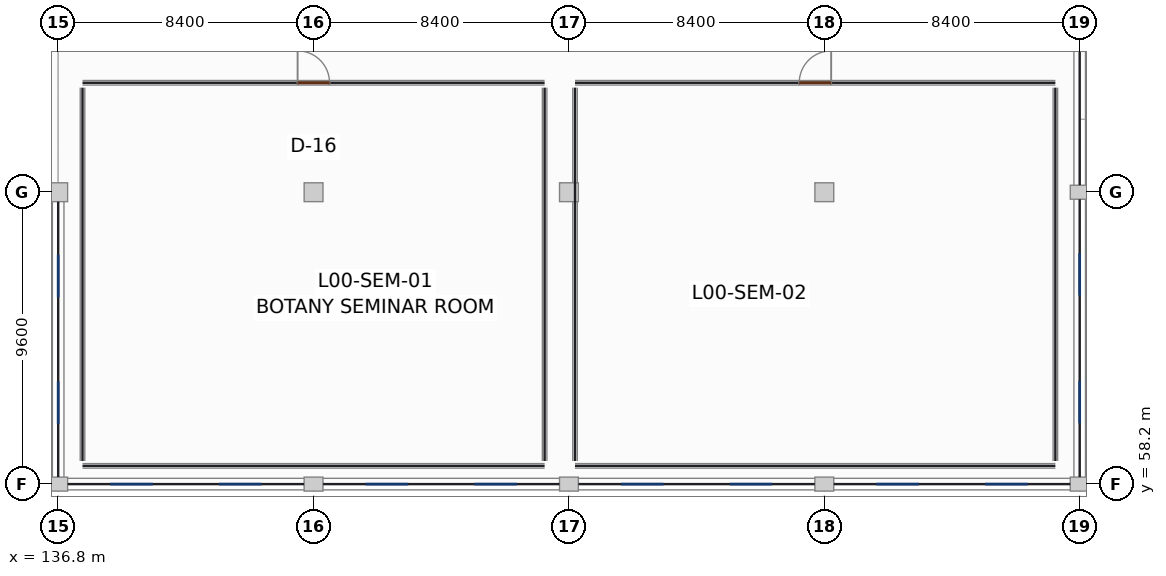
"""IFC4 building model, lengths in metres.
Left out: names, types, materials, properties, quantities, classifications, styles, units other than length and angle.
Written with IfcOpenShell. Run it as: python <this file> out.ifc"""

import sys

from ifc_helpers import new_model, si_unit, direction, frame, frame_2d, origin, origin_2d, place, context, subcontext, project, spatial, rectangle, extrude, element, fill, save


model = new_model("IFC4")
c1 = context("Model", 3, precision=1e-05, world=origin(), true_north=direction((0.0, 1.0)))
c2 = subcontext(c1, "Body", "Model", "MODEL_VIEW")
j1 = project(units=[si_unit("LENGTHUNIT", "METRE"), si_unit("PLANEANGLEUNIT", "RADIAN")], contexts=[c1])
p1 = place(None, origin())
s1 = spatial("IfcSite", under=j1, at=p1, CompositionType="ELEMENT")
p2 = place(p1, origin())
s2 = spatial("IfcBuilding", under=s1, at=p2, CompositionType="ELEMENT")
p3 = place(p2, origin())
s3 = spatial("IfcBuildingStorey", under=s2, at=p3, CompositionType="ELEMENT", Elevation=0.0)
p4 = place(p3, frame((136.8, 58.2, 0.0), z_axis=(0.0, 0.0, 1.0), x_axis=(1.0, 0.0, 0.0)))
e1 = element("IfcColumn", 1, at=p4, inside=s3, PredefinedType="COLUMN", context=c2, shape_type="SweptSolid", body=[
    extrude(rectangle(XDim=0.62, YDim=0.46, at=origin_2d()), origin(), (0.0, 0.0, 1.0), 5.08),
])
p5 = place(p3, frame((136.8, 67.8, 0.0), z_axis=(0.0, 0.0, 1.0), x_axis=(1.0, 0.0, 0.0)))
e2 = element("IfcColumn", 2, at=p5, inside=s3, PredefinedType="COLUMN", context=c2, shape_type="SweptSolid", body=[
    extrude(rectangle(XDim=0.62, YDim=0.62, at=origin_2d()), origin(), (0.0, 0.0, 1.0), 5.08),
])
p6 = place(p3, frame((145.2, 58.2, 0.0), z_axis=(0.0, 0.0, 1.0), x_axis=(1.0, 0.0, 0.0)))
e3 = element("IfcColumn", 3, at=p6, inside=s3, PredefinedType="COLUMN", context=c2, shape_type="SweptSolid", body=[
    extrude(rectangle(XDim=0.62, YDim=0.46, at=origin_2d()), origin(), (0.0, 0.0, 1.0), 5.08),
])
p7 = place(p3, frame((145.2, 67.8, 0.0), z_axis=(0.0, 0.0, 1.0), x_axis=(1.0, 0.0, 0.0)))
e4 = element("IfcColumn", 4, at=p7, inside=s3, PredefinedType="COLUMN", context=c2, shape_type="SweptSolid", body=[
    extrude(rectangle(XDim=0.62, YDim=0.62, at=origin_2d()), origin(), (0.0, 0.0, 1.0), 5.08),
])
p8 = place(p3, frame((153.6, 58.2, 0.0), z_axis=(0.0, 0.0, 1.0), x_axis=(1.0, 0.0, 0.0)))
e5 = element("IfcColumn", 5, at=p8, inside=s3, PredefinedType="COLUMN", context=c2, shape_type="SweptSolid", body=[
    extrude(rectangle(XDim=0.62, YDim=0.46, at=origin_2d()), origin(), (0.0, 0.0, 1.0), 5.08),
])
p9 = place(p3, frame((153.6, 67.8, 0.0), z_axis=(0.0, 0.0, 1.0), x_axis=(1.0, 0.0, 0.0)))
e6 = element("IfcColumn", 6, at=p9, inside=s3, PredefinedType="COLUMN", context=c2, shape_type="SweptSolid", body=[
    extrude(rectangle(XDim=0.62, YDim=0.62, at=origin_2d()), origin(), (0.0, 0.0, 1.0), 5.08),
])
p10 = place(p3, frame((162.0, 58.2, 0.0), z_axis=(0.0, 0.0, 1.0), x_axis=(1.0, 0.0, 0.0)))
e7 = element("IfcColumn", 7, at=p10, inside=s3, PredefinedType="COLUMN", context=c2, shape_type="SweptSolid", body=[
    extrude(rectangle(XDim=0.62, YDim=0.46, at=origin_2d()), origin(), (0.0, 0.0, 1.0), 5.08),
])
p11 = place(p3, frame((162.0, 67.8, 0.0), z_axis=(0.0, 0.0, 1.0), x_axis=(1.0, 0.0, 0.0)))
e8 = element("IfcColumn", 8, at=p11, inside=s3, PredefinedType="COLUMN", context=c2, shape_type="SweptSolid", body=[
    extrude(rectangle(XDim=0.62, YDim=0.62, at=origin_2d()), origin(), (0.0, 0.0, 1.0), 5.08),
])
for number, where, z_axis, x_axis in (
    (9, (170.4, 58.2, 0.0), (0.0, 0.0, 1.0), (1.0, 0.0, 0.0)),
    (10, (170.4, 67.8, 0.0), (0.0, 0.0, 1.0), (1.0, 0.0, 0.0)),
):
    element("IfcColumn", number, at=place(p3, frame(where, z_axis=z_axis, x_axis=x_axis)), inside=s3, PredefinedType="COLUMN", context=c2, shape_type="SweptSolid", body=[
        extrude(rectangle(XDim=0.62, YDim=0.46, at=origin_2d()), origin(), (0.0, 0.0, 1.0), 5.08),
    ])
p12 = place(p3, frame((170.4, 58.432, 0.0), z_axis=(0.0, 0.0, 1.0), x_axis=(0.0, 1.0, 0.0)))
e11 = element("IfcWall", 11, at=p12, inside=s3, PredefinedType="SOLIDWALL", context=c2, shape_type="SweptSolid", body=[
    extrude(rectangle(XDim=9.136, YDim=0.38, at=frame_2d((4.568, 0.0))), origin(), (0.0, 0.0, 1.0), 4.28),
])
p13 = place(p12, frame((1.767, 0.0, 0.85)))
e12 = element("IfcOpeningElement", 12, at=p13, cuts=e11, PredefinedType="OPENING", context=c2, shape_type="SweptSolid", body=[
    extrude(rectangle(XDim=1.4, YDim=1.65, at=frame_2d((0.7, 0.825))), frame((0.0, 0.2, 0.0), z_axis=(0.0, -1.0, 0.0), x_axis=(1.0, 0.0, 0.0)), (0.0, 0.0, 1.0), 0.4),
])
p14 = place(p12, frame((5.969, 0.0, 0.85)))
e13 = element("IfcOpeningElement", 13, at=p14, cuts=e11, PredefinedType="OPENING", context=c2, shape_type="SweptSolid", body=[
    extrude(rectangle(XDim=1.4, YDim=1.65, at=frame_2d((0.7, 0.825))), frame((0.0, 0.2, 0.0), z_axis=(0.0, -1.0, 0.0), x_axis=(1.0, 0.0, 0.0)), (0.0, 0.0, 1.0), 0.4),
])
p15 = place(p3, frame((170.4, 68.032, 0.0), z_axis=(0.0, 0.0, 1.0), x_axis=(0.0, 1.0, 0.0)))
e14 = element("IfcWall", 14, at=p15, inside=s3, PredefinedType="SOLIDWALL", context=c2, shape_type="SweptSolid", body=[
    extrude(rectangle(XDim=9.136, YDim=0.38, at=frame_2d((4.568, 0.0))), origin(), (0.0, 0.0, 1.0), 4.28),
])
p16 = place(p15, frame((4.618, 0.0, 0.0)))
e15 = element("IfcOpeningElement", 15, at=p16, cuts=e14, PredefinedType="OPENING", context=c2, shape_type="SweptSolid", body=[
    extrude(rectangle(XDim=1.5, YDim=2.2, at=frame_2d((0.75, 1.1))), frame((0.0, 0.2, 0.0), z_axis=(0.0, -1.0, 0.0), x_axis=(1.0, 0.0, 0.0)), (0.0, 0.0, 1.0), 0.4),
])
p17 = place(p3, frame((137.112, 58.2, 0.0), z_axis=(0.0, 0.0, 1.0), x_axis=(1.0, 0.0, 0.0)))
e16 = element("IfcWall", 16, at=p17, inside=s3, PredefinedType="SOLIDWALL", context=c2, shape_type="SweptSolid", body=[
    extrude(rectangle(XDim=7.776, YDim=0.38, at=frame_2d((3.888, 0.0))), origin(), (0.0, 0.0, 1.0), 4.28),
])
p18 = place(p17, frame((1.399, 0.0, 0.85)))
e17 = element("IfcOpeningElement", 17, at=p18, cuts=e16, PredefinedType="OPENING", context=c2, shape_type="SweptSolid", body=[
    extrude(rectangle(XDim=1.4, YDim=1.65, at=frame_2d((0.7, 0.825))), frame((0.0, 0.2, 0.0), z_axis=(0.0, -1.0, 0.0), x_axis=(1.0, 0.0, 0.0)), (0.0, 0.0, 1.0), 0.4),
])
p19 = place(p17, frame((4.977, 0.0, 0.85)))
e18 = element("IfcOpeningElement", 18, at=p19, cuts=e16, PredefinedType="OPENING", context=c2, shape_type="SweptSolid", body=[
    extrude(rectangle(XDim=1.4, YDim=1.65, at=frame_2d((0.7, 0.825))), frame((0.0, 0.2, 0.0), z_axis=(0.0, -1.0, 0.0), x_axis=(1.0, 0.0, 0.0)), (0.0, 0.0, 1.0), 0.4),
])
p20 = place(p3, frame((145.512, 58.2, 0.0), z_axis=(0.0, 0.0, 1.0), x_axis=(1.0, 0.0, 0.0)))
e19 = element("IfcWall", 19, at=p20, inside=s3, PredefinedType="SOLIDWALL", context=c2, shape_type="SweptSolid", body=[
    extrude(rectangle(XDim=7.776, YDim=0.38, at=frame_2d((3.888, 0.0))), origin(), (0.0, 0.0, 1.0), 4.28),
])
p21 = place(p20, frame((1.399, 0.0, 0.85)))
e20 = element("IfcOpeningElement", 20, at=p21, cuts=e19, PredefinedType="OPENING", context=c2, shape_type="SweptSolid", body=[
    extrude(rectangle(XDim=1.4, YDim=1.65, at=frame_2d((0.7, 0.825))), frame((0.0, 0.2, 0.0), z_axis=(0.0, -1.0, 0.0), x_axis=(1.0, 0.0, 0.0)), (0.0, 0.0, 1.0), 0.4),
])
p22 = place(p20, frame((4.977, 0.0, 0.85)))
e21 = element("IfcOpeningElement", 21, at=p22, cuts=e19, PredefinedType="OPENING", context=c2, shape_type="SweptSolid", body=[
    extrude(rectangle(XDim=1.4, YDim=1.65, at=frame_2d((0.7, 0.825))), frame((0.0, 0.2, 0.0), z_axis=(0.0, -1.0, 0.0), x_axis=(1.0, 0.0, 0.0)), (0.0, 0.0, 1.0), 0.4),
])
p23 = place(p3, frame((153.912, 58.2, 0.0), z_axis=(0.0, 0.0, 1.0), x_axis=(1.0, 0.0, 0.0)))
e22 = element("IfcWall", 22, at=p23, inside=s3, PredefinedType="SOLIDWALL", context=c2, shape_type="SweptSolid", body=[
    extrude(rectangle(XDim=7.776, YDim=0.38, at=frame_2d((3.888, 0.0))), origin(), (0.0, 0.0, 1.0), 4.28),
])
p24 = place(p23, frame((1.399, 0.0, 0.85)))
e23 = element("IfcOpeningElement", 23, at=p24, cuts=e22, PredefinedType="OPENING", context=c2, shape_type="SweptSolid", body=[
    extrude(rectangle(XDim=1.4, YDim=1.65, at=frame_2d((0.7, 0.825))), frame((0.0, 0.2, 0.0), z_axis=(0.0, -1.0, 0.0), x_axis=(1.0, 0.0, 0.0)), (0.0, 0.0, 1.0), 0.4),
])
p25 = place(p23, frame((4.977, 0.0, 0.85)))
e24 = element("IfcOpeningElement", 24, at=p25, cuts=e22, PredefinedType="OPENING", context=c2, shape_type="SweptSolid", body=[
    extrude(rectangle(XDim=1.4, YDim=1.65, at=frame_2d((0.7, 0.825))), frame((0.0, 0.2, 0.0), z_axis=(0.0, -1.0, 0.0), x_axis=(1.0, 0.0, 0.0)), (0.0, 0.0, 1.0), 0.4),
])
p26 = place(p3, frame((162.312, 58.2, 0.0), z_axis=(0.0, 0.0, 1.0), x_axis=(1.0, 0.0, 0.0)))
e25 = element("IfcWall", 25, at=p26, inside=s3, PredefinedType="SOLIDWALL", context=c2, shape_type="SweptSolid", body=[
    extrude(rectangle(XDim=7.776, YDim=0.38, at=frame_2d((3.888, 0.0))), origin(), (0.0, 0.0, 1.0), 4.28),
])
p27 = place(p26, frame((1.399, 0.0, 0.85)))
e26 = element("IfcOpeningElement", 26, at=p27, cuts=e25, PredefinedType="OPENING", context=c2, shape_type="SweptSolid", body=[
    extrude(rectangle(XDim=1.4, YDim=1.65, at=frame_2d((0.7, 0.825))), frame((0.0, 0.2, 0.0), z_axis=(0.0, -1.0, 0.0), x_axis=(1.0, 0.0, 0.0)), (0.0, 0.0, 1.0), 0.4),
])
p28 = place(p26, frame((4.977, 0.0, 0.85)))
e27 = element("IfcOpeningElement", 27, at=p28, cuts=e25, PredefinedType="OPENING", context=c2, shape_type="SweptSolid", body=[
    extrude(rectangle(XDim=1.4, YDim=1.65, at=frame_2d((0.7, 0.825))), frame((0.0, 0.2, 0.0), z_axis=(0.0, -1.0, 0.0), x_axis=(1.0, 0.0, 0.0)), (0.0, 0.0, 1.0), 0.4),
])
p29 = place(p3, frame((136.8, 58.432, 0.0), z_axis=(0.0, 0.0, 1.0), x_axis=(0.0, 1.0, 0.0)))
e28 = element("IfcWall", 28, at=p29, inside=s3, PredefinedType="SOLIDWALL", context=c2, shape_type="SweptSolid", body=[
    extrude(rectangle(XDim=9.056, YDim=0.38, at=frame_2d((4.528, 0.0))), origin(), (0.0, 0.0, 1.0), 4.28),
])
p30 = place(p29, frame((1.745, 0.0, 0.85)))
e29 = element("IfcOpeningElement", 29, at=p30, cuts=e28, PredefinedType="OPENING", context=c2, shape_type="SweptSolid", body=[
    extrude(rectangle(XDim=1.4, YDim=1.65, at=frame_2d((0.7, 0.825))), frame((0.0, 0.2, 0.0), z_axis=(0.0, -1.0, 0.0), x_axis=(1.0, 0.0, 0.0)), (0.0, 0.0, 1.0), 0.4),
])
p31 = place(p29, frame((5.911, 0.0, 0.85)))
e30 = element("IfcOpeningElement", 30, at=p31, cuts=e28, PredefinedType="OPENING", context=c2, shape_type="SweptSolid", body=[
    extrude(rectangle(XDim=1.4, YDim=1.65, at=frame_2d((0.7, 0.825))), frame((0.0, 0.2, 0.0), z_axis=(0.0, -1.0, 0.0), x_axis=(1.0, 0.0, 0.0)), (0.0, 0.0, 1.0), 0.4),
])
p32 = place(p3, frame((137.6, 58.8, 0.0), z_axis=(0.0, 0.0, 1.0), x_axis=(1.0, 0.0, 0.0)))
e31 = element("IfcWall", 31, at=p32, inside=s3, PredefinedType="PARTITIONING", context=c2, shape_type="SweptSolid", body=[
    extrude(rectangle(XDim=15.2, YDim=0.15, at=frame_2d((7.6, 0.0))), origin(), (0.0, 0.0, 1.0), 4.12),
])
p33 = place(p3, frame((137.6, 71.4, 0.0), z_axis=(0.0, 0.0, 1.0), x_axis=(1.0, 0.0, 0.0)))
e32 = element("IfcWall", 32, at=p33, inside=s3, PredefinedType="PARTITIONING", context=c2, shape_type="SweptSolid", body=[
    extrude(rectangle(XDim=15.2, YDim=0.15, at=frame_2d((7.6, 0.0))), origin(), (0.0, 0.0, 1.0), 4.12),
])
p34 = place(p33, frame((7.075, 0.0, 0.0)))
e33 = element("IfcOpeningElement", 33, at=p34, cuts=e32, PredefinedType="OPENING", context=c2, shape_type="SweptSolid", body=[
    extrude(rectangle(XDim=1.05, YDim=2.2, at=frame_2d((0.525, 1.1))), frame((0.0, 0.085, 0.0), z_axis=(0.0, -1.0, 0.0), x_axis=(1.0, 0.0, 0.0)), (0.0, 0.0, 1.0), 0.17),
])
for number, where, z_axis, x_axis in (
    (34, (137.6, 58.96, 0.0), (0.0, 0.0, 1.0), (0.0, 1.0, 0.0)),
    (35, (152.8, 58.96, 0.0), (0.0, 0.0, 1.0), (0.0, 1.0, 0.0)),
):
    element("IfcWall", number, at=place(p3, frame(where, z_axis=z_axis, x_axis=x_axis)), inside=s3, PredefinedType="PARTITIONING", context=c2, shape_type="SweptSolid", body=[
        extrude(rectangle(XDim=12.28, YDim=0.15, at=frame_2d((6.14, 0.0))), origin(), (0.0, 0.0, 1.0), 4.12),
    ])
p35 = place(p3, frame((153.8, 58.8, 0.0), z_axis=(0.0, 0.0, 1.0), x_axis=(1.0, 0.0, 0.0)))
e36 = element("IfcWall", 36, at=p35, inside=s3, PredefinedType="PARTITIONING", context=c2, shape_type="SweptSolid", body=[
    extrude(rectangle(XDim=15.8, YDim=0.15, at=frame_2d((7.9, 0.0))), origin(), (0.0, 0.0, 1.0), 4.12),
])
p36 = place(p3, frame((153.8, 71.4, 0.0), z_axis=(0.0, 0.0, 1.0), x_axis=(1.0, 0.0, 0.0)))
e37 = element("IfcWall", 37, at=p36, inside=s3, PredefinedType="PARTITIONING", context=c2, shape_type="SweptSolid", body=[
    extrude(rectangle(XDim=15.8, YDim=0.15, at=frame_2d((7.9, 0.0))), origin(), (0.0, 0.0, 1.0), 4.12),
])
p37 = place(p36, frame((7.375, 0.0, 0.0)))
e38 = element("IfcOpeningElement", 38, at=p37, cuts=e37, PredefinedType="OPENING", context=c2, shape_type="SweptSolid", body=[
    extrude(rectangle(XDim=1.05, YDim=2.2, at=frame_2d((0.525, 1.1))), frame((0.0, 0.085, 0.0), z_axis=(0.0, -1.0, 0.0), x_axis=(1.0, 0.0, 0.0)), (0.0, 0.0, 1.0), 0.17),
])
for number, where, z_axis, x_axis in (
    (39, (153.8, 58.96, 0.0), (0.0, 0.0, 1.0), (0.0, 1.0, 0.0)),
    (40, (169.6, 58.96, 0.0), (0.0, 0.0, 1.0), (0.0, 1.0, 0.0)),
):
    element("IfcWall", number, at=place(p3, frame(where, z_axis=z_axis, x_axis=x_axis)), inside=s3, PredefinedType="PARTITIONING", context=c2, shape_type="SweptSolid", body=[
        extrude(rectangle(XDim=12.28, YDim=0.15, at=frame_2d((6.14, 0.0))), origin(), (0.0, 0.0, 1.0), 4.12),
    ])
p38 = place(p13, origin())
e41 = element("IfcWindow", 41, at=p38, inside=s3, PartitioningType="SINGLE_PANEL", PredefinedType="WINDOW", context=c2, shape_type="SweptSolid", body=[
    extrude(rectangle(XDim=1.4, YDim=1.65, at=frame_2d((0.7, 0.825))), frame((0.0, 0.03, 0.0), z_axis=(0.0, -1.0, 0.0), x_axis=(1.0, 0.0, 0.0)), (0.0, 0.0, 1.0), 0.06),
])
fill(e12, e41)
p39 = place(p14, origin())
e42 = element("IfcWindow", 42, at=p39, inside=s3, PartitioningType="SINGLE_PANEL", PredefinedType="WINDOW", context=c2, shape_type="SweptSolid", body=[
    extrude(rectangle(XDim=1.4, YDim=1.65, at=frame_2d((0.7, 0.825))), frame((0.0, 0.03, 0.0), z_axis=(0.0, -1.0, 0.0), x_axis=(1.0, 0.0, 0.0)), (0.0, 0.0, 1.0), 0.06),
])
fill(e13, e42)
p40 = place(p18, origin())
e43 = element("IfcWindow", 43, at=p40, inside=s3, PartitioningType="SINGLE_PANEL", PredefinedType="WINDOW", context=c2, shape_type="SweptSolid", body=[
    extrude(rectangle(XDim=1.4, YDim=1.65, at=frame_2d((0.7, 0.825))), frame((0.0, 0.03, 0.0), z_axis=(0.0, -1.0, 0.0), x_axis=(1.0, 0.0, 0.0)), (0.0, 0.0, 1.0), 0.06),
])
fill(e17, e43)
p41 = place(p19, origin())
e44 = element("IfcWindow", 44, at=p41, inside=s3, PartitioningType="SINGLE_PANEL", PredefinedType="WINDOW", context=c2, shape_type="SweptSolid", body=[
    extrude(rectangle(XDim=1.4, YDim=1.65, at=frame_2d((0.7, 0.825))), frame((0.0, 0.03, 0.0), z_axis=(0.0, -1.0, 0.0), x_axis=(1.0, 0.0, 0.0)), (0.0, 0.0, 1.0), 0.06),
])
fill(e18, e44)
p42 = place(p21, origin())
e45 = element("IfcWindow", 45, at=p42, inside=s3, PartitioningType="SINGLE_PANEL", PredefinedType="WINDOW", context=c2, shape_type="SweptSolid", body=[
    extrude(rectangle(XDim=1.4, YDim=1.65, at=frame_2d((0.7, 0.825))), frame((0.0, 0.03, 0.0), z_axis=(0.0, -1.0, 0.0), x_axis=(1.0, 0.0, 0.0)), (0.0, 0.0, 1.0), 0.06),
])
fill(e20, e45)
p43 = place(p22, origin())
e46 = element("IfcWindow", 46, at=p43, inside=s3, PartitioningType="SINGLE_PANEL", PredefinedType="WINDOW", context=c2, shape_type="SweptSolid", body=[
    extrude(rectangle(XDim=1.4, YDim=1.65, at=frame_2d((0.7, 0.825))), frame((0.0, 0.03, 0.0), z_axis=(0.0, -1.0, 0.0), x_axis=(1.0, 0.0, 0.0)), (0.0, 0.0, 1.0), 0.06),
])
fill(e21, e46)
p44 = place(p24, origin())
e47 = element("IfcWindow", 47, at=p44, inside=s3, PartitioningType="SINGLE_PANEL", PredefinedType="WINDOW", context=c2, shape_type="SweptSolid", body=[
    extrude(rectangle(XDim=1.4, YDim=1.65, at=frame_2d((0.7, 0.825))), frame((0.0, 0.03, 0.0), z_axis=(0.0, -1.0, 0.0), x_axis=(1.0, 0.0, 0.0)), (0.0, 0.0, 1.0), 0.06),
])
fill(e23, e47)
p45 = place(p25, origin())
e48 = element("IfcWindow", 48, at=p45, inside=s3, PartitioningType="SINGLE_PANEL", PredefinedType="WINDOW", context=c2, shape_type="SweptSolid", body=[
    extrude(rectangle(XDim=1.4, YDim=1.65, at=frame_2d((0.7, 0.825))), frame((0.0, 0.03, 0.0), z_axis=(0.0, -1.0, 0.0), x_axis=(1.0, 0.0, 0.0)), (0.0, 0.0, 1.0), 0.06),
])
fill(e24, e48)
p46 = place(p27, origin())
e49 = element("IfcWindow", 49, at=p46, inside=s3, PartitioningType="SINGLE_PANEL", PredefinedType="WINDOW", context=c2, shape_type="SweptSolid", body=[
    extrude(rectangle(XDim=1.4, YDim=1.65, at=frame_2d((0.7, 0.825))), frame((0.0, 0.03, 0.0), z_axis=(0.0, -1.0, 0.0), x_axis=(1.0, 0.0, 0.0)), (0.0, 0.0, 1.0), 0.06),
])
fill(e26, e49)
p47 = place(p28, origin())
e50 = element("IfcWindow", 50, at=p47, inside=s3, PartitioningType="SINGLE_PANEL", PredefinedType="WINDOW", context=c2, shape_type="SweptSolid", body=[
    extrude(rectangle(XDim=1.4, YDim=1.65, at=frame_2d((0.7, 0.825))), frame((0.0, 0.03, 0.0), z_axis=(0.0, -1.0, 0.0), x_axis=(1.0, 0.0, 0.0)), (0.0, 0.0, 1.0), 0.06),
])
fill(e27, e50)
p48 = place(p30, origin())
e51 = element("IfcWindow", 51, at=p48, inside=s3, PartitioningType="SINGLE_PANEL", PredefinedType="WINDOW", context=c2, shape_type="SweptSolid", body=[
    extrude(rectangle(XDim=1.4, YDim=1.65, at=frame_2d((0.7, 0.825))), frame((0.0, 0.03, 0.0), z_axis=(0.0, -1.0, 0.0), x_axis=(1.0, 0.0, 0.0)), (0.0, 0.0, 1.0), 0.06),
])
fill(e29, e51)
p49 = place(p31, origin())
e52 = element("IfcWindow", 52, at=p49, inside=s3, PartitioningType="SINGLE_PANEL", PredefinedType="WINDOW", context=c2, shape_type="SweptSolid", body=[
    extrude(rectangle(XDim=1.4, YDim=1.65, at=frame_2d((0.7, 0.825))), frame((0.0, 0.03, 0.0), z_axis=(0.0, -1.0, 0.0), x_axis=(1.0, 0.0, 0.0)), (0.0, 0.0, 1.0), 0.06),
])
fill(e30, e52)
p50 = place(p34, origin())
e53 = element("IfcDoor", 53, at=p50, inside=s3, OperationType="SINGLE_SWING_LEFT", PredefinedType="DOOR", context=c2, shape_type="SweptSolid", body=[
    extrude(rectangle(XDim=1.05, YDim=2.2, at=frame_2d((0.525, 1.1))), frame((0.0, 0.025, 0.0), z_axis=(0.0, -1.0, 0.0), x_axis=(1.0, 0.0, 0.0)), (0.0, 0.0, 1.0), 0.05),
])
fill(e33, e53)
p51 = place(p37, origin())
e54 = element("IfcDoor", 54, at=p51, inside=s3, OperationType="SINGLE_SWING_RIGHT", PredefinedType="DOOR", context=c2, shape_type="SweptSolid", body=[
    extrude(rectangle(XDim=1.05, YDim=2.2, at=frame_2d((0.525, 1.1))), frame((0.0, 0.025, 0.0), z_axis=(0.0, -1.0, 0.0), x_axis=(1.0, 0.0, 0.0)), (0.0, 0.0, 1.0), 0.05),
])
fill(e38, e54)
save(model, sys.argv[1])
